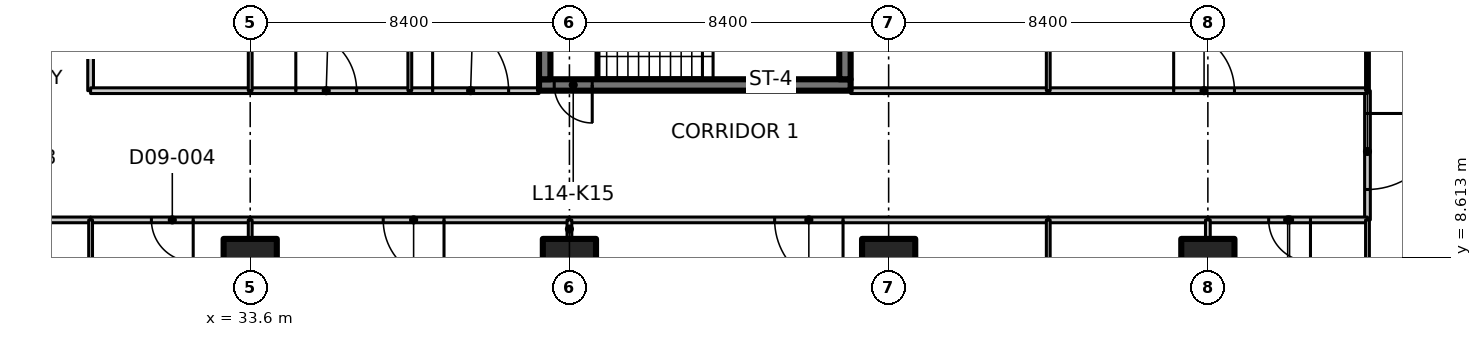
"""IFC4 building model, lengths in metres.
Left out: names, types, materials, properties, quantities, classifications, styles, units other than length and angle.
Written with IfcOpenShell. Run it as: python <this file> out.ifc"""

import sys

from ifc_helpers import new_model, si_unit, direction, frame, frame_2d, origin, origin_2d, place, context, subcontext, project, spatial, polyline, rectangle, outline, extrude, element, fill, save


model = new_model("IFC4")
c1 = context("Model", 3, precision=1e-05, world=origin(), true_north=direction((0.0, 1.0)))
c2 = subcontext(c1, "Body", "Model", "MODEL_VIEW")
j1 = project(units=[si_unit("LENGTHUNIT", "METRE"), si_unit("PLANEANGLEUNIT", "RADIAN")], contexts=[c1])
p1 = place(None, origin())
s1 = spatial("IfcSite", under=j1, at=p1, CompositionType="ELEMENT")
p2 = place(p1, origin())
s2 = spatial("IfcBuilding", under=s1, at=p2, CompositionType="ELEMENT")
p3 = place(p2, frame((0.0, 0.0, 65.3)))
s3 = spatial("IfcBuildingStorey", under=s2, at=p3, CompositionType="ELEMENT", Elevation=65.3)
for number, where, z_axis, x_axis in (
    (1, (33.6, 8.4, 0.0), (0.0, 0.0, 1.0), (1.0, 0.0, 0.0)),
    (2, (42.0, 8.4, 0.0), (0.0, 0.0, 1.0), (1.0, 0.0, 0.0)),
    (3, (50.4, 8.4, 0.0), (0.0, 0.0, 1.0), (1.0, 0.0, 0.0)),
    (4, (58.8, 8.4, 0.0), (0.0, 0.0, 1.0), (1.0, 0.0, 0.0)),
):
    element("IfcColumn", number, at=place(p3, frame(where, z_axis=z_axis, x_axis=x_axis)), inside=s3, PredefinedType="COLUMN", context=c2, shape_type="SweptSolid", body=[
        extrude(rectangle(XDim=1.4, YDim=1.4, at=origin_2d()), origin(), (0.0, 0.0, 1.0), 3.35),
    ])
p4 = place(p3, frame((49.4, 13.15, 0.0), z_axis=(0.0, 0.0, 1.0), x_axis=(-1.0, 0.0, 0.0)))
e5 = element("IfcWall", 5, at=p4, inside=s3, PredefinedType="SHEAR", context=c2, shape_type="SweptSolid", body=[
    extrude(rectangle(XDim=8.2, YDim=0.3, at=frame_2d((4.1, 0.0))), origin(), (0.0, 0.0, 1.0), 3.35),
])
p5 = place(p4, frame((6.8, 0.0, 0.0)))
e6 = element("IfcOpeningElement", 6, at=p5, cuts=e5, PredefinedType="OPENING", context=c2, shape_type="SweptSolid", body=[
    extrude(rectangle(XDim=1.0, YDim=2.1, at=frame_2d((0.5, 1.05))), frame((0.0, 0.16, 0.0), z_axis=(0.0, -1.0, 0.0), x_axis=(1.0, 0.0, 0.0)), (0.0, 0.0, 1.0), 0.32),
])
for number, where, z_axis, x_axis in (
    (7, (41.35, 13.3, 0.0), (0.0, 0.0, 1.0), (0.0, 1.0, 0.0)),
    (8, (49.25, 13.3, 0.0), (0.0, 0.0, 1.0), (0.0, 1.0, 0.0)),
):
    element("IfcWall", number, at=place(p3, frame(where, z_axis=z_axis, x_axis=x_axis)), inside=s3, PredefinedType="SHEAR", context=c2, shape_type="SweptSolid", body=[
        extrude(rectangle(XDim=2.55, YDim=0.3, at=frame_2d((1.275, 0.0))), origin(), (0.0, 0.0, 1.0), 3.35),
    ])
p6 = place(p3, frame((29.4, 9.6, 0.0), z_axis=(0.0, 0.0, 1.0), x_axis=(-1.0, 0.0, 0.0)))
e9 = element("IfcWall", 9, at=p6, inside=s3, PredefinedType="PARTITIONING", context=c2, shape_type="SweptSolid", body=[
    extrude(rectangle(XDim=4.2, YDim=0.15, at=frame_2d((2.1, 0.0))), origin(), (0.0, 0.0, 1.0), 3.33),
])
p7 = place(p6, frame((1.5, 0.0, 0.0)))
e10 = element("IfcOpeningElement", 10, at=p7, cuts=e9, PredefinedType="OPENING", context=c2, shape_type="SweptSolid", body=[
    extrude(rectangle(XDim=1.1, YDim=2.1, at=frame_2d((0.55, 1.05))), frame((0.0, 0.085, 0.0), z_axis=(0.0, -1.0, 0.0), x_axis=(1.0, 0.0, 0.0)), (0.0, 0.0, 1.0), 0.17),
])
p8 = place(p3, frame((29.4, 21.2, 0.0), z_axis=(0.0, 0.0, 1.0), x_axis=(0.0, -1.0, 0.0)))
e11 = element("IfcWall", 11, at=p8, inside=s3, PredefinedType="PARTITIONING", context=c2, shape_type="SweptSolid", body=[
    extrude(rectangle(XDim=8.2, YDim=0.15, at=frame_2d((4.1, 0.0))), origin(), (0.0, 0.0, 1.0), 3.33),
])
p9 = place(p8, frame((3.3, 0.0, 0.0)))
e12 = element("IfcOpeningElement", 12, at=p9, cuts=e11, PredefinedType="OPENING", context=c2, shape_type="SweptSolid", body=[
    extrude(rectangle(XDim=1.6, YDim=2.1, at=frame_2d((0.8, 1.05))), frame((0.0, 0.085, 0.0), z_axis=(0.0, -1.0, 0.0), x_axis=(1.0, 0.0, 0.0)), (0.0, 0.0, 1.0), 0.17),
])
p10 = place(p3, frame((63.0, 13.0, 0.0), z_axis=(0.0, 0.0, 1.0), x_axis=(0.0, -1.0, 0.0)))
e13 = element("IfcWall", 13, at=p10, inside=s3, PredefinedType="PARTITIONING", context=c2, shape_type="SweptSolid", body=[
    extrude(rectangle(XDim=3.4, YDim=0.15, at=frame_2d((1.7, 0.0))), origin(), (0.0, 0.0, 1.0), 3.33),
])
p11 = place(p10, frame((0.6, 0.0, 0.0)))
e14 = element("IfcOpeningElement", 14, at=p11, cuts=e13, PredefinedType="OPENING", context=c2, shape_type="SweptSolid", body=[
    extrude(rectangle(XDim=2.0, YDim=2.4, at=frame_2d((1.0, 1.2))), frame((0.0, 0.085, 0.0), z_axis=(0.0, -1.0, 0.0), x_axis=(1.0, 0.0, 0.0)), (0.0, 0.0, 1.0), 0.17),
])
p12 = place(p3, frame((33.6, 9.6, 0.0), z_axis=(0.0, 0.0, 1.0), x_axis=(-1.0, 0.0, 0.0)))
e15 = element("IfcWall", 15, at=p12, inside=s3, PredefinedType="PARTITIONING", context=c2, shape_type="SweptSolid", body=[
    extrude(rectangle(XDim=4.2, YDim=0.15, at=frame_2d((2.1, 0.0))), origin(), (0.0, 0.0, 1.0), 3.33),
])
p13 = place(p12, frame((1.5, 0.0, 0.0)))
e16 = element("IfcOpeningElement", 16, at=p13, cuts=e15, PredefinedType="OPENING", context=c2, shape_type="SweptSolid", body=[
    extrude(rectangle(XDim=1.1, YDim=2.1, at=frame_2d((0.55, 1.05))), frame((0.0, 0.085, 0.0), z_axis=(0.0, -1.0, 0.0), x_axis=(1.0, 0.0, 0.0)), (0.0, 0.0, 1.0), 0.17),
])
p14 = place(p3, frame((42.0, 9.6, 0.0), z_axis=(0.0, 0.0, 1.0), x_axis=(-1.0, 0.0, 0.0)))
e17 = element("IfcWall", 17, at=p14, inside=s3, PredefinedType="PARTITIONING", context=c2, shape_type="SweptSolid", body=[
    extrude(rectangle(XDim=8.4, YDim=0.15, at=frame_2d((4.2, 0.0))), origin(), (0.0, 0.0, 1.0), 3.33),
])
p15 = place(p14, frame((3.3, 0.0, 0.0)))
e18 = element("IfcOpeningElement", 18, at=p15, cuts=e17, PredefinedType="OPENING", context=c2, shape_type="SweptSolid", body=[
    extrude(rectangle(XDim=1.6, YDim=2.1, at=frame_2d((0.8, 1.05))), frame((0.0, 0.085, 0.0), z_axis=(0.0, -1.0, 0.0), x_axis=(1.0, 0.0, 0.0)), (0.0, 0.0, 1.0), 0.17),
])
p16 = place(p3, frame((54.6, 9.6, 0.0), z_axis=(0.0, 0.0, 1.0), x_axis=(-1.0, 0.0, 0.0)))
e19 = element("IfcWall", 19, at=p16, inside=s3, PredefinedType="PARTITIONING", context=c2, shape_type="SweptSolid", body=[
    extrude(rectangle(XDim=12.6, YDim=0.15, at=frame_2d((6.3, 0.0))), origin(), (0.0, 0.0, 1.0), 3.33),
])
p17 = place(p16, frame((5.4, 0.0, 0.0)))
e20 = element("IfcOpeningElement", 20, at=p17, cuts=e19, PredefinedType="OPENING", context=c2, shape_type="SweptSolid", body=[
    extrude(rectangle(XDim=1.8, YDim=2.1, at=frame_2d((0.9, 1.05))), frame((0.0, 0.085, 0.0), z_axis=(0.0, -1.0, 0.0), x_axis=(1.0, 0.0, 0.0)), (0.0, 0.0, 1.0), 0.17),
])
p18 = place(p3, frame((58.8, 9.6, 0.0), z_axis=(0.0, 0.0, 1.0), x_axis=(-1.0, 0.0, 0.0)))
e21 = element("IfcWall", 21, at=p18, inside=s3, PredefinedType="PARTITIONING", context=c2, shape_type="SweptSolid", body=[
    extrude(rectangle(XDim=4.2, YDim=0.15, at=frame_2d((2.1, 0.0))), origin(), (0.0, 0.0, 1.0), 3.33),
])
p19 = place(p3, frame((63.0, 9.6, 0.0), z_axis=(0.0, 0.0, 1.0), x_axis=(-1.0, 0.0, 0.0)))
e22 = element("IfcWall", 22, at=p19, inside=s3, PredefinedType="PARTITIONING", context=c2, shape_type="SweptSolid", body=[
    extrude(rectangle(XDim=4.2, YDim=0.15, at=frame_2d((2.1, 0.0))), origin(), (0.0, 0.0, 1.0), 3.33),
])
p20 = place(p19, frame((1.5, 0.0, 0.0)))
e23 = element("IfcOpeningElement", 23, at=p20, cuts=e22, PredefinedType="OPENING", context=c2, shape_type="SweptSolid", body=[
    extrude(rectangle(XDim=1.1, YDim=2.1, at=frame_2d((0.55, 1.05))), frame((0.0, 0.085, 0.0), z_axis=(0.0, -1.0, 0.0), x_axis=(1.0, 0.0, 0.0)), (0.0, 0.0, 1.0), 0.17),
])
p21 = place(p3, frame((29.4, 13.0, 0.0), z_axis=(0.0, 0.0, 1.0), x_axis=(1.0, 0.0, 0.0)))
e24 = element("IfcWall", 24, at=p21, inside=s3, PredefinedType="PARTITIONING", context=c2, shape_type="SweptSolid", body=[
    extrude(rectangle(XDim=4.2, YDim=0.15, at=frame_2d((2.1, 0.0))), origin(), (0.0, 0.0, 1.0), 3.33),
])
p22 = place(p3, frame((33.6, 13.0, 0.0), z_axis=(0.0, 0.0, 1.0), x_axis=(1.0, 0.0, 0.0)))
e25 = element("IfcWall", 25, at=p22, inside=s3, PredefinedType="PARTITIONING", context=c2, shape_type="SweptSolid", body=[
    extrude(rectangle(XDim=4.2, YDim=0.15, at=frame_2d((2.1, 0.0))), origin(), (0.0, 0.0, 1.0), 3.33),
])
p23 = place(p22, frame((1.2, 0.0, 0.0)))
e26 = element("IfcOpeningElement", 26, at=p23, cuts=e25, PredefinedType="OPENING", context=c2, shape_type="SweptSolid", body=[
    extrude(rectangle(XDim=1.6, YDim=2.1, at=frame_2d((0.8, 1.05))), frame((0.0, 0.085, 0.0), z_axis=(0.0, -1.0, 0.0), x_axis=(1.0, 0.0, 0.0)), (0.0, 0.0, 1.0), 0.17),
])
p24 = place(p3, frame((37.8, 13.0, 0.0), z_axis=(0.0, 0.0, 1.0), x_axis=(1.0, 0.0, 0.0)))
e27 = element("IfcWall", 27, at=p24, inside=s3, PredefinedType="PARTITIONING", context=c2, shape_type="SweptSolid", body=[
    extrude(rectangle(XDim=3.4, YDim=0.15, at=frame_2d((1.7, 0.0))), origin(), (0.0, 0.0, 1.0), 3.33),
])
p25 = place(p24, frame((0.6, 0.0, 0.0)))
e28 = element("IfcOpeningElement", 28, at=p25, cuts=e27, PredefinedType="OPENING", context=c2, shape_type="SweptSolid", body=[
    extrude(rectangle(XDim=2.0, YDim=2.4, at=frame_2d((1.0, 1.2))), frame((0.0, 0.085, 0.0), z_axis=(0.0, -1.0, 0.0), x_axis=(1.0, 0.0, 0.0)), (0.0, 0.0, 1.0), 0.17),
])
p26 = place(p3, frame((49.4, 13.0, 0.0), z_axis=(0.0, 0.0, 1.0), x_axis=(1.0, 0.0, 0.0)))
e29 = element("IfcWall", 29, at=p26, inside=s3, PredefinedType="PARTITIONING", context=c2, shape_type="SweptSolid", body=[
    extrude(rectangle(XDim=5.2, YDim=0.15, at=frame_2d((2.6, 0.0))), origin(), (0.0, 0.0, 1.0), 3.33),
])
p27 = place(p3, frame((54.6, 13.0, 0.0), z_axis=(0.0, 0.0, 1.0), x_axis=(1.0, 0.0, 0.0)))
e30 = element("IfcWall", 30, at=p27, inside=s3, PredefinedType="PARTITIONING", context=c2, shape_type="SweptSolid", body=[
    extrude(rectangle(XDim=8.4, YDim=0.15, at=frame_2d((4.2, 0.0))), origin(), (0.0, 0.0, 1.0), 3.33),
])
p28 = place(p27, frame((3.3, 0.0, 0.0)))
e31 = element("IfcOpeningElement", 31, at=p28, cuts=e30, PredefinedType="OPENING", context=c2, shape_type="SweptSolid", body=[
    extrude(rectangle(XDim=1.6, YDim=2.1, at=frame_2d((0.8, 1.05))), frame((0.0, 0.085, 0.0), z_axis=(0.0, -1.0, 0.0), x_axis=(1.0, 0.0, 0.0)), (0.0, 0.0, 1.0), 0.17),
])
p29 = place(p3, frame((63.0, -0.2, 0.0), z_axis=(0.0, 0.0, 1.0), x_axis=(0.0, 1.0, 0.0)))
e32 = element("IfcWall", 32, at=p29, inside=s3, PredefinedType="PARTITIONING", context=c2, shape_type="SweptSolid", body=[
    extrude(outline(polyline([(0.0, 0.0), (9.8, 0.0), (9.8, 3.33), (5.066, 3.33), (5.064, 2.98), (3.736, 2.98), (3.734, 3.33), (0.0, 3.33), (0.0, 0.0)])), frame((0.0, 0.05, 0.0), z_axis=(0.0, -1.0, 0.0), x_axis=(1.0, 0.0, 0.0)), (0.0, 0.0, 1.0), 0.1),
])
p30 = place(p3, frame((63.0, 13.0, 0.0), z_axis=(0.0, 0.0, 1.0), x_axis=(0.0, 1.0, 0.0)))
e33 = element("IfcWall", 33, at=p30, inside=s3, PredefinedType="PARTITIONING", context=c2, shape_type="SweptSolid", body=[
    extrude(outline(polyline([(0.0, 0.0), (12.4, 0.0), (12.4, 3.33), (8.666, 3.33), (8.664, 2.98), (7.336, 2.98), (7.334, 3.33), (0.0, 3.33), (0.0, 0.0)])), frame((0.0, 0.05, 0.0), z_axis=(0.0, -1.0, 0.0), x_axis=(1.0, 0.0, 0.0)), (0.0, 0.0, 1.0), 0.1),
])
p31 = place(p3, frame((29.4, 9.6, 0.0), z_axis=(0.0, 0.0, 1.0), x_axis=(0.0, -1.0, 0.0)))
e34 = element("IfcWall", 34, at=p31, inside=s3, PredefinedType="PARTITIONING", context=c2, shape_type="SweptSolid", body=[
    extrude(outline(polyline([(0.0, 0.0), (10.965, 0.0), (10.965, 3.33), (10.7, 3.33), (10.05, 3.33), (10.048, 2.98), (9.152, 2.98), (9.15, 3.33), (0.0, 3.33), (0.0, 0.0)])), frame((0.0, 0.05, 0.0), z_axis=(0.0, -1.0, 0.0), x_axis=(1.0, 0.0, 0.0)), (0.0, 0.0, 1.0), 0.1),
])
p32 = place(p3, frame((33.6, 9.6, 0.0), z_axis=(0.0, 0.0, 1.0), x_axis=(0.0, -1.0, 0.0)))
e35 = element("IfcWall", 35, at=p32, inside=s3, PredefinedType="PARTITIONING", context=c2, shape_type="SweptSolid", body=[
    extrude(rectangle(XDim=0.48, YDim=0.1, at=frame_2d((0.24, 0.0))), origin(), (0.0, 0.0, 1.0), 3.33),
])
p33 = place(p3, frame((42.0, 9.6, 0.0), z_axis=(0.0, 0.0, 1.0), x_axis=(0.0, -1.0, 0.0)))
e36 = element("IfcWall", 36, at=p33, inside=s3, PredefinedType="PARTITIONING", context=c2, shape_type="SweptSolid", body=[
    extrude(rectangle(XDim=0.48, YDim=0.125, at=frame_2d((0.24, 0.0))), origin(), (0.0, 0.0, 1.0), 3.33),
])
p34 = place(p3, frame((54.6, 9.6, 0.0), z_axis=(0.0, 0.0, 1.0), x_axis=(0.0, -1.0, 0.0)))
e37 = element("IfcWall", 37, at=p34, inside=s3, PredefinedType="PARTITIONING", context=c2, shape_type="SweptSolid", body=[
    extrude(rectangle(XDim=4.2, YDim=0.1, at=frame_2d((2.1, 0.0))), origin(), (0.0, 0.0, 1.0), 3.33),
])
p35 = place(p3, frame((58.8, 9.6, 0.0), z_axis=(0.0, 0.0, 1.0), x_axis=(0.0, -1.0, 0.0)))
e38 = element("IfcWall", 38, at=p35, inside=s3, PredefinedType="PARTITIONING", context=c2, shape_type="SweptSolid", body=[
    extrude(rectangle(XDim=0.48, YDim=0.125, at=frame_2d((0.24, 0.0))), origin(), (0.0, 0.0, 1.0), 3.33),
])
p36 = place(p3, frame((33.6, 16.08, 0.0), z_axis=(0.0, 0.0, 1.0), x_axis=(0.0, -1.0, 0.0)))
e39 = element("IfcWall", 39, at=p36, inside=s3, PredefinedType="PARTITIONING", context=c2, shape_type="SweptSolid", body=[
    extrude(rectangle(XDim=3.08, YDim=0.1, at=frame_2d((1.54, 0.0))), origin(), (0.0, 0.0, 1.0), 3.33),
])
p37 = place(p3, frame((37.8, 30.243, 0.0), z_axis=(0.0, 0.0, 1.0), x_axis=(0.0, -1.0, 0.0)))
e40 = element("IfcWall", 40, at=p37, inside=s3, PredefinedType="PARTITIONING", context=c2, shape_type="SweptSolid", body=[
    extrude(outline(polyline([(0.0, 0.0), (17.243, 0.0), (17.243, 3.33), (5.493, 3.33), (5.491, 2.98), (4.595, 2.98), (4.593, 3.33), (0.0, 3.33), (0.0, 0.0)])), frame((0.0, 0.05, 0.0), z_axis=(0.0, -1.0, 0.0), x_axis=(1.0, 0.0, 0.0)), (0.0, 0.0, 1.0), 0.1),
])
p38 = place(p3, frame((54.6, 26.374, 0.0), z_axis=(0.0, 0.0, 1.0), x_axis=(0.0, -1.0, 0.0)))
e41 = element("IfcWall", 41, at=p38, inside=s3, PredefinedType="PARTITIONING", context=c2, shape_type="SweptSolid", body=[
    extrude(outline(polyline([(0.0, 0.0), (13.374, 0.0), (13.374, 3.33), (1.624, 3.33), (1.622, 2.98), (0.726, 2.98), (0.724, 3.33), (0.074, 3.33), (0.0, 3.33), (0.0, 0.0)])), frame((0.0, 0.05, 0.0), z_axis=(0.0, -1.0, 0.0), x_axis=(1.0, 0.0, 0.0)), (0.0, 0.0, 1.0), 0.1),
])
p39 = place(p5, origin())
e42 = element("IfcDoor", 42, at=p39, inside=s3, OperationType="SINGLE_SWING_RIGHT", PredefinedType="DOOR", context=c2, shape_type="SweptSolid", body=[
    extrude(rectangle(XDim=1.0, YDim=2.1, at=frame_2d((0.5, 1.05))), frame((0.0, 0.025, 0.0), z_axis=(0.0, -1.0, 0.0), x_axis=(1.0, 0.0, 0.0)), (0.0, 0.0, 1.0), 0.05),
])
fill(e6, e42)
p40 = place(p11, origin())
e43 = element("IfcDoor", 43, at=p40, inside=s3, OperationType="DOUBLE_DOOR_SINGLE_SWING", PredefinedType="DOOR", context=c2, shape_type="SweptSolid", body=[
    extrude(rectangle(XDim=2.0, YDim=2.4, at=frame_2d((1.0, 1.2))), frame((0.0, 0.025, 0.0), z_axis=(0.0, -1.0, 0.0), x_axis=(1.0, 0.0, 0.0)), (0.0, 0.0, 1.0), 0.05),
])
fill(e14, e43)
p41 = place(p13, origin())
e44 = element("IfcDoor", 44, at=p41, inside=s3, OperationType="SINGLE_SWING_LEFT", PredefinedType="DOOR", context=c2, shape_type="SweptSolid", body=[
    extrude(rectangle(XDim=1.1, YDim=2.1, at=frame_2d((0.55, 1.05))), frame((0.0, 0.025, 0.0), z_axis=(0.0, -1.0, 0.0), x_axis=(1.0, 0.0, 0.0)), (0.0, 0.0, 1.0), 0.05),
])
fill(e16, e44)
p42 = place(p15, origin())
e45 = element("IfcDoor", 45, at=p42, inside=s3, OperationType="DOUBLE_DOOR_SINGLE_SWING", PredefinedType="DOOR", context=c2, shape_type="SweptSolid", body=[
    extrude(rectangle(XDim=1.6, YDim=2.1, at=frame_2d((0.8, 1.05))), frame((0.0, 0.025, 0.0), z_axis=(0.0, -1.0, 0.0), x_axis=(1.0, 0.0, 0.0)), (0.0, 0.0, 1.0), 0.05),
])
fill(e18, e45)
p43 = place(p17, origin())
e46 = element("IfcDoor", 46, at=p43, inside=s3, OperationType="DOUBLE_DOOR_SINGLE_SWING", PredefinedType="DOOR", context=c2, shape_type="SweptSolid", body=[
    extrude(rectangle(XDim=1.8, YDim=2.1, at=frame_2d((0.9, 1.05))), frame((0.0, 0.025, 0.0), z_axis=(0.0, -1.0, 0.0), x_axis=(1.0, 0.0, 0.0)), (0.0, 0.0, 1.0), 0.05),
])
fill(e20, e46)
p44 = place(p20, origin())
e47 = element("IfcDoor", 47, at=p44, inside=s3, OperationType="SINGLE_SWING_LEFT", PredefinedType="DOOR", context=c2, shape_type="SweptSolid", body=[
    extrude(rectangle(XDim=1.1, YDim=2.1, at=frame_2d((0.55, 1.05))), frame((0.0, 0.025, 0.0), z_axis=(0.0, -1.0, 0.0), x_axis=(1.0, 0.0, 0.0)), (0.0, 0.0, 1.0), 0.05),
])
fill(e23, e47)
p45 = place(p23, origin())
e48 = element("IfcDoor", 48, at=p45, inside=s3, OperationType="DOUBLE_DOOR_SINGLE_SWING", PredefinedType="DOOR", context=c2, shape_type="SweptSolid", body=[
    extrude(rectangle(XDim=1.6, YDim=2.1, at=frame_2d((0.8, 1.05))), frame((0.0, 0.025, 0.0), z_axis=(0.0, -1.0, 0.0), x_axis=(1.0, 0.0, 0.0)), (0.0, 0.0, 1.0), 0.05),
])
fill(e26, e48)
p46 = place(p25, origin())
e49 = element("IfcDoor", 49, at=p46, inside=s3, OperationType="DOUBLE_DOOR_SINGLE_SWING", PredefinedType="DOOR", context=c2, shape_type="SweptSolid", body=[
    extrude(rectangle(XDim=2.0, YDim=2.4, at=frame_2d((1.0, 1.2))), frame((0.0, 0.025, 0.0), z_axis=(0.0, -1.0, 0.0), x_axis=(1.0, 0.0, 0.0)), (0.0, 0.0, 1.0), 0.05),
])
fill(e28, e49)
p47 = place(p28, origin())
e50 = element("IfcDoor", 50, at=p47, inside=s3, OperationType="DOUBLE_DOOR_SINGLE_SWING", PredefinedType="DOOR", context=c2, shape_type="SweptSolid", body=[
    extrude(rectangle(XDim=1.6, YDim=2.1, at=frame_2d((0.8, 1.05))), frame((0.0, 0.025, 0.0), z_axis=(0.0, -1.0, 0.0), x_axis=(1.0, 0.0, 0.0)), (0.0, 0.0, 1.0), 0.05),
])
fill(e31, e50)
save(model, sys.argv[1])
